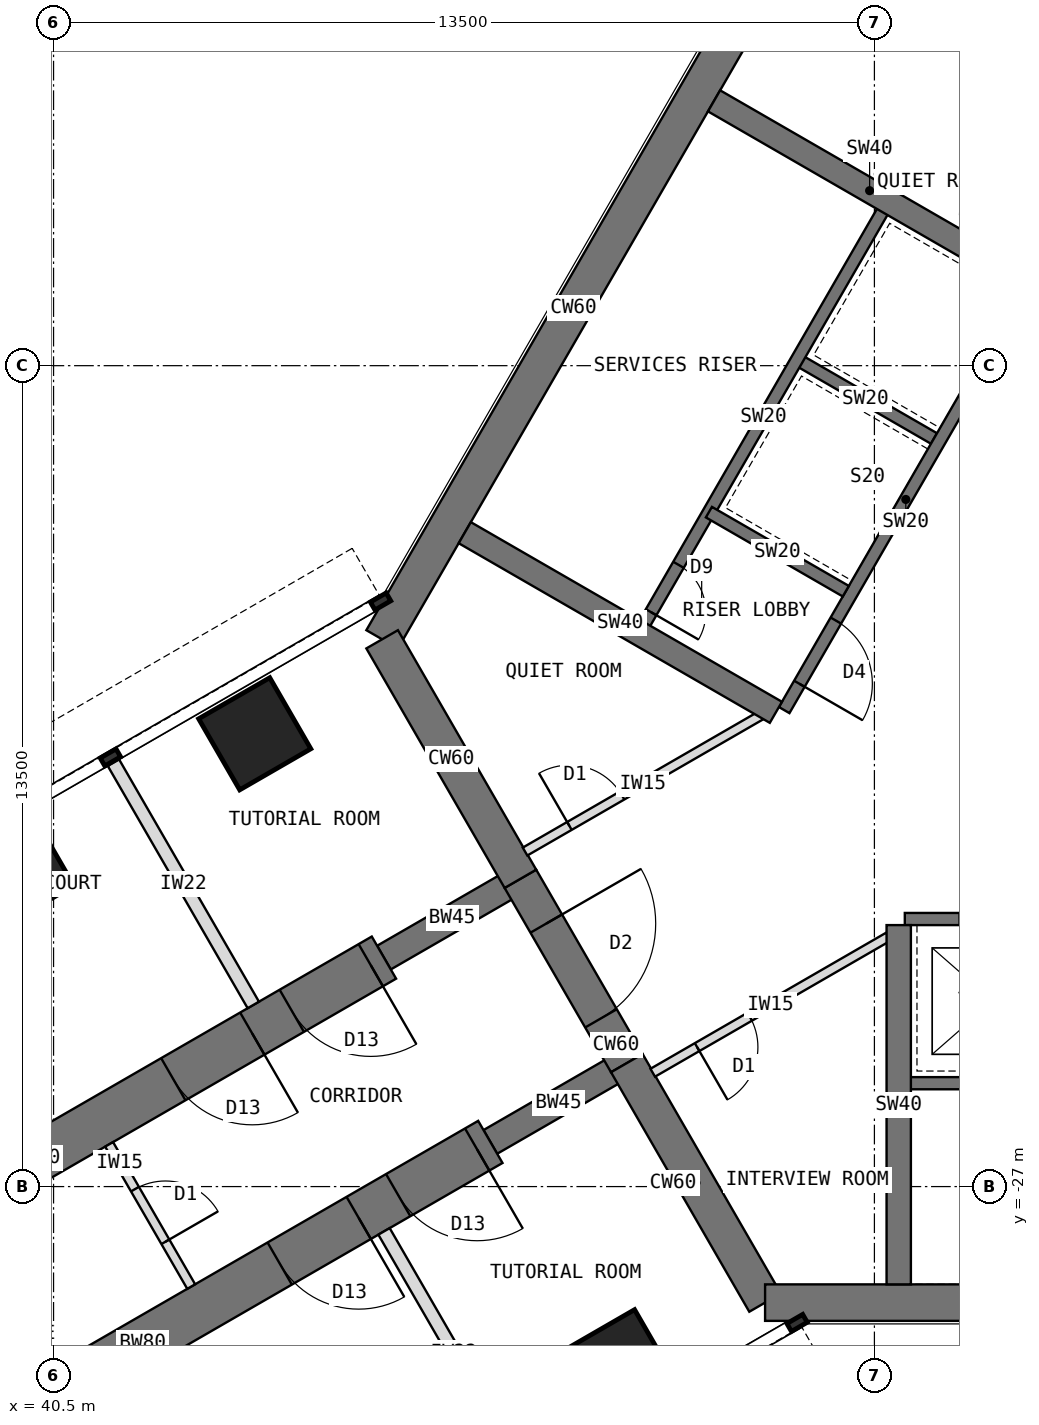
"""IFC4 building model, lengths in metres.
Left out: names, types, materials, properties, quantities, classifications, styles, units other than length and angle.
Written with IfcOpenShell. Run it as: python <this file> out.ifc"""

import sys

from ifc_helpers import new_model, si_unit, direction, frame, frame_2d, origin, origin_2d, place, context, subcontext, project, spatial, rectangle, extrude, element, fill, save


model = new_model("IFC4")
c1 = context("Model", 3, precision=1e-05, world=origin(), true_north=direction((0.0, 1.0)))
c2 = subcontext(c1, "Body", "Model", "MODEL_VIEW")
j1 = project(units=[si_unit("LENGTHUNIT", "METRE"), si_unit("PLANEANGLEUNIT", "RADIAN")], contexts=[c1])
p1 = place(None, origin())
s1 = spatial("IfcSite", under=j1, at=p1, CompositionType="ELEMENT")
p2 = place(p1, origin())
s2 = spatial("IfcBuilding", under=s1, at=p2, CompositionType="ELEMENT")
p3 = place(p2, frame((0.0, 0.0, 113.5)))
s3 = spatial("IfcBuildingStorey", under=s2, at=p3, CompositionType="ELEMENT", Elevation=113.5)
p4 = place(p3, frame((52.202, -7.092, 0.0), z_axis=(0.0, 0.0, 1.0), x_axis=(-0.500005998175, -0.866021940709, 0.0)))
e1 = element("IfcWall", 1, at=p4, inside=s3, PredefinedType="SHEAR", context=c2, shape_type="SweptSolid", body=[
    extrude(rectangle(XDim=12.596, YDim=0.6, at=frame_2d((6.298, 0.0))), origin(), (0.0, 0.0, 1.0), 4.0),
])
p5 = place(p3, frame((45.904, -18.0, 0.0), z_axis=(0.0, 0.0, 1.0), x_axis=(0.500024481964, -0.866011268655, 0.0)))
e2 = element("IfcWall", 2, at=p5, inside=s3, PredefinedType="SHEAR", context=c2, shape_type="SweptSolid", body=[
    extrude(rectangle(XDim=4.548, YDim=0.6, at=frame_2d((2.274, 0.0))), origin(), (0.0, 0.0, 1.0), 4.0),
])
p6 = place(p3, frame((48.178, -21.939, 0.0), z_axis=(0.0, 0.0, 1.0), x_axis=(0.500010275428, -0.866019471182, 0.0)))
e3 = element("IfcWall", 3, at=p6, inside=s3, PredefinedType="SHEAR", context=c2, shape_type="SweptSolid", body=[
    extrude(rectangle(XDim=3.5, YDim=0.6, at=frame_2d((1.75, 0.0))), origin(), (0.0, 0.0, 1.0), 4.0),
])
p7 = place(p6, frame((0.85, 0.0, 0.0)))
e4 = element("IfcOpeningElement", 4, at=p7, cuts=e3, PredefinedType="OPENING", context=c2, shape_type="SweptSolid", body=[
    extrude(rectangle(XDim=1.8, YDim=2.1, at=frame_2d((0.9, 1.05))), frame((0.0, 0.31, 0.0), z_axis=(0.0, -1.0, 0.0), x_axis=(1.0, 0.0, 0.0)), (0.0, 0.0, 1.0), 0.62),
])
p8 = place(p3, frame((49.928, -24.97, 0.0), z_axis=(0.0, 0.0, 1.0), x_axis=(0.499984222037, -0.866034513004, 0.0)))
e5 = element("IfcWall", 5, at=p8, inside=s3, PredefinedType="SHEAR", context=c2, shape_type="SweptSolid", body=[
    extrude(rectangle(XDim=4.548, YDim=0.6, at=frame_2d((2.274, 0.0))), origin(), (0.0, 0.0, 1.0), 4.0),
])
p9 = place(p3, frame((52.202, -28.908, 0.0), z_axis=(0.0, 0.0, 1.0), x_axis=(1.0, 0.0, 0.0)))
e6 = element("IfcWall", 6, at=p9, inside=s3, PredefinedType="SHEAR", context=c2, shape_type="SweptSolid", body=[
    extrude(rectangle(XDim=12.596, YDim=0.6, at=frame_2d((6.298, 0.0))), origin(), (0.0, 0.0, 1.0), 4.0),
])
p10 = place(p3, frame((49.928, -24.97, 0.0), z_axis=(0.0, 0.0, 1.0), x_axis=(-0.866031863473, -0.499988811324, 0.0)))
e7 = element("IfcWall", 7, at=p10, inside=s3, PredefinedType="SHEAR", context=c2, shape_type="SweptSolid", body=[
    extrude(rectangle(XDim=2.592, YDim=0.45, at=frame_2d((1.296, 0.0))), origin(), (0.0, 0.0, 1.0), 4.0),
])
p11 = place(p3, frame((47.684, -26.266, 0.0), z_axis=(0.0, 0.0, 1.0), x_axis=(-0.866027579429, -0.499996231654, 0.0)))
e8 = element("IfcWall", 8, at=p11, inside=s3, PredefinedType="SHEAR", context=c2, shape_type="SweptSolid", body=[
    extrude(rectangle(XDim=13.2, YDim=0.8, at=frame_2d((6.6, 0.0))), origin(), (0.0, 0.0, 1.0), 4.0),
])
p12 = place(p11, frame((0.25, 0.0, 0.0)))
e9 = element("IfcOpeningElement", 9, at=p12, cuts=e8, PredefinedType="OPENING", context=c2, shape_type="SweptSolid", body=[
    extrude(rectangle(XDim=1.5, YDim=2.1, at=frame_2d((0.75, 1.05))), frame((0.0, 0.41, 0.0), z_axis=(0.0, -1.0, 0.0), x_axis=(1.0, 0.0, 0.0)), (0.0, 0.0, 1.0), 0.82),
])
p13 = place(p11, frame((2.5, 0.0, 0.0)))
e10 = element("IfcOpeningElement", 10, at=p13, cuts=e8, PredefinedType="OPENING", context=c2, shape_type="SweptSolid", body=[
    extrude(rectangle(XDim=1.5, YDim=2.1, at=frame_2d((0.75, 1.05))), frame((0.0, 0.41, 0.0), z_axis=(0.0, -1.0, 0.0), x_axis=(1.0, 0.0, 0.0)), (0.0, 0.0, 1.0), 0.82),
])
p14 = place(p3, frame((48.178, -21.939, 0.0), z_axis=(0.0, 0.0, 1.0), x_axis=(-0.866072649678, -0.499918158782, 0.0)))
e11 = element("IfcWall", 11, at=p14, inside=s3, PredefinedType="SHEAR", context=c2, shape_type="SweptSolid", body=[
    extrude(rectangle(XDim=2.592, YDim=0.45, at=frame_2d((1.296, 0.0))), origin(), (0.0, 0.0, 1.0), 4.0),
])
p15 = place(p3, frame((45.934, -23.234, 0.0), z_axis=(0.0, 0.0, 1.0), x_axis=(-0.866019570528, -0.500010103361, 0.0)))
e12 = element("IfcWall", 12, at=p15, inside=s3, PredefinedType="SHEAR", context=c2, shape_type="SweptSolid", body=[
    extrude(rectangle(XDim=13.2, YDim=0.8, at=frame_2d((6.6, 0.0))), origin(), (0.0, 0.0, 1.0), 4.0),
])
p16 = place(p15, frame((0.25, 0.0, 0.0)))
e13 = element("IfcOpeningElement", 13, at=p16, cuts=e12, PredefinedType="OPENING", context=c2, shape_type="SweptSolid", body=[
    extrude(rectangle(XDim=1.5, YDim=2.1, at=frame_2d((0.75, 1.05))), frame((0.0, 0.41, 0.0), z_axis=(0.0, -1.0, 0.0), x_axis=(1.0, 0.0, 0.0)), (0.0, 0.0, 1.0), 0.82),
])
p17 = place(p15, frame((2.5, 0.0, 0.0)))
e14 = element("IfcOpeningElement", 14, at=p17, cuts=e12, PredefinedType="OPENING", context=c2, shape_type="SweptSolid", body=[
    extrude(rectangle(XDim=1.5, YDim=2.1, at=frame_2d((0.75, 1.05))), frame((0.0, 0.41, 0.0), z_axis=(0.0, -1.0, 0.0), x_axis=(1.0, 0.0, 0.0)), (0.0, 0.0, 1.0), 0.82),
])
for number, where, z_axis, x_axis in (
    (15, (49.809, -29.946, 0.0), (0.0, 0.0, 1.0), (0.866, 0.5, 0.0)),
    (16, (43.809, -19.554, 0.0), (0.0, 0.0, 1.0), (0.866, 0.5, 0.0)),
    (17, (39.912, -21.804, 0.0), (0.0, 0.0, 1.0), (0.866, 0.5, 0.0)),
):
    element("IfcColumn", number, at=place(p3, frame(where, z_axis=z_axis, x_axis=x_axis)), inside=s3, PredefinedType="COLUMN", context=c2, shape_type="SweptSolid", body=[
        extrude(rectangle(XDim=1.35, YDim=1.35, at=origin_2d()), origin(), (0.0, 0.0, 1.0), 4.0),
    ])
p18 = place(p3, frame((56.516, -12.236, 0.0), z_axis=(0.0, 0.0, 1.0), x_axis=(-0.49999894854, -0.866026010844, 0.0)))
e18 = element("IfcWall", 18, at=p18, inside=s3, PredefinedType="SHEAR", context=c2, shape_type="SweptSolid", body=[
    extrude(rectangle(XDim=8.0, YDim=0.2, at=frame_2d((4.0, 0.0))), origin(), (0.0, 0.0, 1.0), 4.0),
])
p19 = place(p18, frame((6.3, 0.0, 0.0)))
e19 = element("IfcOpeningElement", 19, at=p19, cuts=e18, PredefinedType="OPENING", context=c2, shape_type="SweptSolid", body=[
    extrude(rectangle(XDim=1.2, YDim=2.1, at=frame_2d((0.6, 1.05))), frame((0.0, 0.11, 0.0), z_axis=(0.0, -1.0, 0.0), x_axis=(1.0, 0.0, 0.0)), (0.0, 0.0, 1.0), 0.22),
])
for number, where, z_axis, x_axis in (
    (20, (54.98, -14.697, 0.0), (0.0, 0.0, 1.0), (-0.866, 0.5, 0.0)),
    (21, (53.53, -17.209, 0.0), (0.0, 0.0, 1.0), (-0.866, 0.5, 0.0)),
):
    element("IfcWall", number, at=place(p3, frame(where, z_axis=z_axis, x_axis=x_axis)), inside=s3, PredefinedType="SHEAR", context=c2, shape_type="SweptSolid", body=[
        extrude(rectangle(XDim=2.6, YDim=0.2, at=frame_2d((1.3, 0.0))), origin(), (0.0, 0.0, 1.0), 4.0),
    ])
p20 = place(p3, frame((54.178, -10.886, 0.0), z_axis=(0.0, 0.0, 1.0), x_axis=(-0.49999894854, -0.866026010844, 0.0)))
e22 = element("IfcWall", 22, at=p20, inside=s3, PredefinedType="SHEAR", context=c2, shape_type="SweptSolid", body=[
    extrude(rectangle(XDim=8.0, YDim=0.2, at=frame_2d((4.0, 0.0))), origin(), (0.0, 0.0, 1.0), 4.0),
])
p21 = place(p20, frame((6.8, 0.0, 0.0)))
e23 = element("IfcOpeningElement", 23, at=p21, cuts=e22, PredefinedType="OPENING", context=c2, shape_type="SweptSolid", body=[
    extrude(rectangle(XDim=0.9, YDim=2.1, at=frame_2d((0.45, 1.05))), frame((0.0, 0.11, 0.0), z_axis=(0.0, -1.0, 0.0), x_axis=(1.0, 0.0, 0.0)), (0.0, 0.0, 1.0), 0.22),
])
p22 = place(p3, frame((52.38, -19.201, 0.0), z_axis=(0.0, 0.0, 1.0), x_axis=(-0.866027317282, 0.49999668571, 0.0)))
e24 = element("IfcWall", 24, at=p22, inside=s3, PredefinedType="SHEAR", context=c2, shape_type="SweptSolid", body=[
    extrude(rectangle(XDim=5.908, YDim=0.4, at=frame_2d((2.954, 0.0))), origin(), (0.0, 0.0, 1.0), 4.0),
])
p23 = place(p3, frame((56.48, -12.099, 0.0), z_axis=(0.0, 0.0, 1.0), x_axis=(-0.866009424208, 0.500027676417, 0.0)))
e25 = element("IfcWall", 25, at=p23, inside=s3, PredefinedType="SHEAR", context=c2, shape_type="SweptSolid", body=[
    extrude(rectangle(XDim=5.908, YDim=0.4, at=frame_2d((2.954, 0.0))), origin(), (0.0, 0.0, 1.0), 4.0),
])
p24 = place(p3, frame((54.5, -22.6, 0.0), z_axis=(0.0, 0.0, 1.0), x_axis=(1.0, 0.0, 0.0)))
e26 = element("IfcWall", 26, at=p24, inside=s3, PredefinedType="SHEAR", context=c2, shape_type="SweptSolid", body=[
    extrude(rectangle(XDim=8.0, YDim=0.2, at=frame_2d((4.0, 0.0))), origin(), (0.0, 0.0, 1.0), 4.0),
])
p25 = place(p24, frame((6.3, 0.0, 0.0)))
e27 = element("IfcOpeningElement", 27, at=p25, cuts=e26, PredefinedType="OPENING", context=c2, shape_type="SweptSolid", body=[
    extrude(rectangle(XDim=1.2, YDim=2.1, at=frame_2d((0.6, 1.05))), frame((0.0, 0.11, 0.0), z_axis=(0.0, -1.0, 0.0), x_axis=(1.0, 0.0, 0.0)), (0.0, 0.0, 1.0), 0.22),
])
p26 = place(p24, frame((0.9, 0.0, 0.0)))
e28 = element("IfcOpeningElement", 28, at=p26, cuts=e26, PredefinedType="OPENING", context=c2, shape_type="SweptSolid", body=[
    extrude(rectangle(XDim=1.1, YDim=2.2, at=frame_2d((0.55, 1.1))), frame((0.0, 0.11, 0.0), z_axis=(0.0, -1.0, 0.0), x_axis=(1.0, 0.0, 0.0)), (0.0, 0.0, 1.0), 0.22),
])
p27 = place(p3, frame((54.5, -25.3, 0.0), z_axis=(0.0, 0.0, 1.0), x_axis=(1.0, 0.0, 0.0)))
e29 = element("IfcWall", 29, at=p27, inside=s3, PredefinedType="SHEAR", context=c2, shape_type="SweptSolid", body=[
    extrude(rectangle(XDim=8.0, YDim=0.2, at=frame_2d((4.0, 0.0))), origin(), (0.0, 0.0, 1.0), 4.0),
])
p28 = place(p27, frame((6.7, 0.0, 0.0)))
e30 = element("IfcOpeningElement", 30, at=p28, cuts=e29, PredefinedType="OPENING", context=c2, shape_type="SweptSolid", body=[
    extrude(rectangle(XDim=1.1, YDim=2.1, at=frame_2d((0.55, 1.05))), frame((0.0, 0.11, 0.0), z_axis=(0.0, -1.0, 0.0), x_axis=(1.0, 0.0, 0.0)), (0.0, 0.0, 1.0), 0.22),
])
p29 = place(p3, frame((54.4, -22.7, 0.0), z_axis=(0.0, 0.0, 1.0), x_axis=(0.0, -1.0, 0.0)))
e31 = element("IfcWall", 31, at=p29, inside=s3, PredefinedType="SHEAR", context=c2, shape_type="SweptSolid", body=[
    extrude(rectangle(XDim=5.908, YDim=0.4, at=frame_2d((2.954, 0.0))), origin(), (0.0, 0.0, 1.0), 4.0),
])
for number, where, z_axis, x_axis in (
    (32, (45.935, -27.737, 0.0), (0.0, 0.0, 1.0), (0.5, -0.866, 0.0)),
    (33, (43.785, -24.013, 0.0), (0.0, 0.0, 1.0), (-0.5, 0.866, 0.0)),
):
    element("IfcWall", number, at=place(p3, frame(where, z_axis=z_axis, x_axis=x_axis)), inside=s3, PredefinedType="PARTITIONING", context=c2, shape_type="SweptSolid", body=[
        extrude(rectangle(XDim=4.6, YDim=0.215, at=frame_2d((2.3, 0.0))), origin(), (0.0, 0.0, 1.0), 3.8),
    ])
p30 = place(p3, frame((48.254, -21.49, 0.0), z_axis=(0.0, 0.0, 1.0), x_axis=(0.866025707867, 0.499999473313, 0.0)))
e34 = element("IfcWall", 34, at=p30, inside=s3, PredefinedType="PARTITIONING", context=c2, shape_type="SweptSolid", body=[
    extrude(rectangle(XDim=4.476, YDim=0.15, at=frame_2d((2.238, 0.0))), origin(), (0.0, 0.0, 1.0), 3.8),
])
p31 = place(p30, frame((0.843, 0.0, 0.0)))
e35 = element("IfcOpeningElement", 35, at=p31, cuts=e34, PredefinedType="OPENING", context=c2, shape_type="SweptSolid", body=[
    extrude(rectangle(XDim=1.0, YDim=2.1, at=frame_2d((0.5, 1.05))), frame((0.0, 0.085, 0.0), z_axis=(0.0, -1.0, 0.0), x_axis=(1.0, 0.0, 0.0)), (0.0, 0.0, 1.0), 0.17),
])
p32 = place(p3, frame((54.23, -22.89, 0.0), z_axis=(0.0, 0.0, 1.0), x_axis=(-0.866025707867, -0.499999473313, 0.0)))
e36 = element("IfcWall", 36, at=p32, inside=s3, PredefinedType="PARTITIONING", context=c2, shape_type="SweptSolid", body=[
    extrude(rectangle(XDim=4.476, YDim=0.15, at=frame_2d((2.238, 0.0))), origin(), (0.0, 0.0, 1.0), 3.8),
])
p33 = place(p32, frame((2.633, 0.0, 0.0)))
e37 = element("IfcOpeningElement", 37, at=p33, cuts=e36, PredefinedType="OPENING", context=c2, shape_type="SweptSolid", body=[
    extrude(rectangle(XDim=1.0, YDim=2.1, at=frame_2d((0.5, 1.05))), frame((0.0, 0.085, 0.0), z_axis=(0.0, -1.0, 0.0), x_axis=(1.0, 0.0, 0.0)), (0.0, 0.0, 1.0), 0.17),
])
p34 = place(p3, frame((41.414, -26.306, 0.0), z_axis=(0.0, 0.0, 1.0), x_axis=(0.500048589285, -0.86599734893, 0.0)))
e38 = element("IfcWall", 38, at=p34, inside=s3, PredefinedType="PARTITIONING", context=c2, shape_type="SweptSolid", body=[
    extrude(rectangle(XDim=2.7, YDim=0.15, at=frame_2d((1.35, 0.0))), origin(), (0.0, 0.0, 1.0), 3.8),
])
p35 = place(p34, frame((0.85, 0.0, 0.0)))
e39 = element("IfcOpeningElement", 39, at=p35, cuts=e38, PredefinedType="OPENING", context=c2, shape_type="SweptSolid", body=[
    extrude(rectangle(XDim=1.0, YDim=2.1, at=frame_2d((0.5, 1.05))), frame((0.0, 0.085, 0.0), z_axis=(0.0, -1.0, 0.0), x_axis=(1.0, 0.0, 0.0)), (0.0, 0.0, 1.0), 0.17),
])
p36 = place(p19, origin())
e40 = element("IfcDoor", 40, at=p36, inside=s3, OperationType="SINGLE_SWING_RIGHT", PredefinedType="DOOR", context=c2, shape_type="SweptSolid", body=[
    extrude(rectangle(XDim=1.2, YDim=2.1, at=frame_2d((0.6, 1.05))), frame((0.0, 0.025, 0.0), z_axis=(0.0, -1.0, 0.0), x_axis=(1.0, 0.0, 0.0)), (0.0, 0.0, 1.0), 0.05),
])
fill(e19, e40)
p37 = place(p21, origin())
e41 = element("IfcDoor", 41, at=p37, inside=s3, OperationType="SINGLE_SWING_RIGHT", PredefinedType="DOOR", context=c2, shape_type="SweptSolid", body=[
    extrude(rectangle(XDim=0.9, YDim=2.1, at=frame_2d((0.45, 1.05))), frame((0.0, 0.025, 0.0), z_axis=(0.0, -1.0, 0.0), x_axis=(1.0, 0.0, 0.0)), (0.0, 0.0, 1.0), 0.05),
])
fill(e23, e41)
p38 = place(p7, origin())
e42 = element("IfcDoor", 42, at=p38, inside=s3, OperationType="DOUBLE_DOOR_DOUBLE_SWING", PredefinedType="DOOR", context=c2, shape_type="SweptSolid", body=[
    extrude(rectangle(XDim=1.72, YDim=2.06, at=frame_2d((0.9, 1.03))), frame((0.0, 0.025, 0.0), z_axis=(0.0, -1.0, 0.0), x_axis=(1.0, 0.0, 0.0)), (0.0, 0.0, 1.0), 0.05),
    extrude(rectangle(XDim=0.04, YDim=2.1, at=frame_2d((0.02, 1.05))), frame((0.0, 0.3, 0.0), z_axis=(0.0, -1.0, 0.0), x_axis=(1.0, 0.0, 0.0)), (0.0, 0.0, 1.0), 0.6),
    extrude(rectangle(XDim=0.04, YDim=2.1, at=frame_2d((1.78, 1.05))), frame((0.0, 0.3, 0.0), z_axis=(0.0, -1.0, 0.0), x_axis=(1.0, 0.0, 0.0)), (0.0, 0.0, 1.0), 0.6),
    extrude(rectangle(XDim=1.72, YDim=0.04, at=frame_2d((0.9, 2.08))), frame((0.0, 0.3, 0.0), z_axis=(0.0, -1.0, 0.0), x_axis=(1.0, 0.0, 0.0)), (0.0, 0.0, 1.0), 0.6),
])
fill(e4, e42)
p39 = place(p31, origin())
e43 = element("IfcDoor", 43, at=p39, inside=s3, OperationType="SINGLE_SWING_LEFT", PredefinedType="DOOR", context=c2, shape_type="SweptSolid", body=[
    extrude(rectangle(XDim=1.0, YDim=2.1, at=frame_2d((0.5, 1.05))), frame((0.0, 0.025, 0.0), z_axis=(0.0, -1.0, 0.0), x_axis=(1.0, 0.0, 0.0)), (0.0, 0.0, 1.0), 0.05),
])
fill(e35, e43)
p40 = place(p33, origin())
e44 = element("IfcDoor", 44, at=p40, inside=s3, OperationType="SINGLE_SWING_RIGHT", PredefinedType="DOOR", context=c2, shape_type="SweptSolid", body=[
    extrude(rectangle(XDim=1.0, YDim=2.1, at=frame_2d((0.5, 1.05))), frame((0.0, 0.025, 0.0), z_axis=(0.0, -1.0, 0.0), x_axis=(1.0, 0.0, 0.0)), (0.0, 0.0, 1.0), 0.05),
])
fill(e37, e44)
p41 = place(p35, origin())
e45 = element("IfcDoor", 45, at=p41, inside=s3, OperationType="SINGLE_SWING_RIGHT", PredefinedType="DOOR", context=c2, shape_type="SweptSolid", body=[
    extrude(rectangle(XDim=1.0, YDim=2.1, at=frame_2d((0.5, 1.05))), frame((0.0, 0.025, 0.0), z_axis=(0.0, -1.0, 0.0), x_axis=(1.0, 0.0, 0.0)), (0.0, 0.0, 1.0), 0.05),
])
fill(e39, e45)
p42 = place(p12, origin())
e46 = element("IfcDoor", 46, at=p42, inside=s3, OperationType="DOUBLE_DOOR_SINGLE_SWING", PredefinedType="DOOR", context=c2, shape_type="SweptSolid", body=[
    extrude(rectangle(XDim=1.42, YDim=2.06, at=frame_2d((0.75, 1.03))), frame((0.0, 0.025, 0.0), z_axis=(0.0, -1.0, 0.0), x_axis=(1.0, 0.0, 0.0)), (0.0, 0.0, 1.0), 0.05),
    extrude(rectangle(XDim=0.04, YDim=2.1, at=frame_2d((0.02, 1.05))), frame((0.0, 0.4, 0.0), z_axis=(0.0, -1.0, 0.0), x_axis=(1.0, 0.0, 0.0)), (0.0, 0.0, 1.0), 0.8),
    extrude(rectangle(XDim=0.04, YDim=2.1, at=frame_2d((1.48, 1.05))), frame((0.0, 0.4, 0.0), z_axis=(0.0, -1.0, 0.0), x_axis=(1.0, 0.0, 0.0)), (0.0, 0.0, 1.0), 0.8),
    extrude(rectangle(XDim=1.42, YDim=0.04, at=frame_2d((0.75, 2.08))), frame((0.0, 0.4, 0.0), z_axis=(0.0, -1.0, 0.0), x_axis=(1.0, 0.0, 0.0)), (0.0, 0.0, 1.0), 0.8),
])
fill(e9, e46)
p43 = place(p13, origin())
e47 = element("IfcDoor", 47, at=p43, inside=s3, OperationType="DOUBLE_DOOR_SINGLE_SWING", PredefinedType="DOOR", context=c2, shape_type="SweptSolid", body=[
    extrude(rectangle(XDim=1.42, YDim=2.06, at=frame_2d((0.75, 1.03))), frame((0.0, 0.025, 0.0), z_axis=(0.0, -1.0, 0.0), x_axis=(1.0, 0.0, 0.0)), (0.0, 0.0, 1.0), 0.05),
    extrude(rectangle(XDim=0.04, YDim=2.1, at=frame_2d((0.02, 1.05))), frame((0.0, 0.4, 0.0), z_axis=(0.0, -1.0, 0.0), x_axis=(1.0, 0.0, 0.0)), (0.0, 0.0, 1.0), 0.8),
    extrude(rectangle(XDim=0.04, YDim=2.1, at=frame_2d((1.48, 1.05))), frame((0.0, 0.4, 0.0), z_axis=(0.0, -1.0, 0.0), x_axis=(1.0, 0.0, 0.0)), (0.0, 0.0, 1.0), 0.8),
    extrude(rectangle(XDim=1.42, YDim=0.04, at=frame_2d((0.75, 2.08))), frame((0.0, 0.4, 0.0), z_axis=(0.0, -1.0, 0.0), x_axis=(1.0, 0.0, 0.0)), (0.0, 0.0, 1.0), 0.8),
])
fill(e10, e47)
p44 = place(p16, origin())
e48 = element("IfcDoor", 48, at=p44, inside=s3, OperationType="DOUBLE_DOOR_SINGLE_SWING", PredefinedType="DOOR", context=c2, shape_type="SweptSolid", body=[
    extrude(rectangle(XDim=1.42, YDim=2.06, at=frame_2d((0.75, 1.03))), frame((0.0, 0.025, 0.0), z_axis=(0.0, -1.0, 0.0), x_axis=(1.0, 0.0, 0.0)), (0.0, 0.0, 1.0), 0.05),
    extrude(rectangle(XDim=0.04, YDim=2.1, at=frame_2d((0.02, 1.05))), frame((0.0, 0.4, 0.0), z_axis=(0.0, -1.0, 0.0), x_axis=(1.0, 0.0, 0.0)), (0.0, 0.0, 1.0), 0.8),
    extrude(rectangle(XDim=0.04, YDim=2.1, at=frame_2d((1.48, 1.05))), frame((0.0, 0.4, 0.0), z_axis=(0.0, -1.0, 0.0), x_axis=(1.0, 0.0, 0.0)), (0.0, 0.0, 1.0), 0.8),
    extrude(rectangle(XDim=1.42, YDim=0.04, at=frame_2d((0.75, 2.08))), frame((0.0, 0.4, 0.0), z_axis=(0.0, -1.0, 0.0), x_axis=(1.0, 0.0, 0.0)), (0.0, 0.0, 1.0), 0.8),
])
fill(e13, e48)
p45 = place(p17, origin())
e49 = element("IfcDoor", 49, at=p45, inside=s3, OperationType="DOUBLE_DOOR_SINGLE_SWING", PredefinedType="DOOR", context=c2, shape_type="SweptSolid", body=[
    extrude(rectangle(XDim=1.42, YDim=2.06, at=frame_2d((0.75, 1.03))), frame((0.0, 0.025, 0.0), z_axis=(0.0, -1.0, 0.0), x_axis=(1.0, 0.0, 0.0)), (0.0, 0.0, 1.0), 0.05),
    extrude(rectangle(XDim=0.04, YDim=2.1, at=frame_2d((0.02, 1.05))), frame((0.0, 0.4, 0.0), z_axis=(0.0, -1.0, 0.0), x_axis=(1.0, 0.0, 0.0)), (0.0, 0.0, 1.0), 0.8),
    extrude(rectangle(XDim=0.04, YDim=2.1, at=frame_2d((1.48, 1.05))), frame((0.0, 0.4, 0.0), z_axis=(0.0, -1.0, 0.0), x_axis=(1.0, 0.0, 0.0)), (0.0, 0.0, 1.0), 0.8),
    extrude(rectangle(XDim=1.42, YDim=0.04, at=frame_2d((0.75, 2.08))), frame((0.0, 0.4, 0.0), z_axis=(0.0, -1.0, 0.0), x_axis=(1.0, 0.0, 0.0)), (0.0, 0.0, 1.0), 0.8),
])
fill(e14, e49)
save(model, sys.argv[1])
